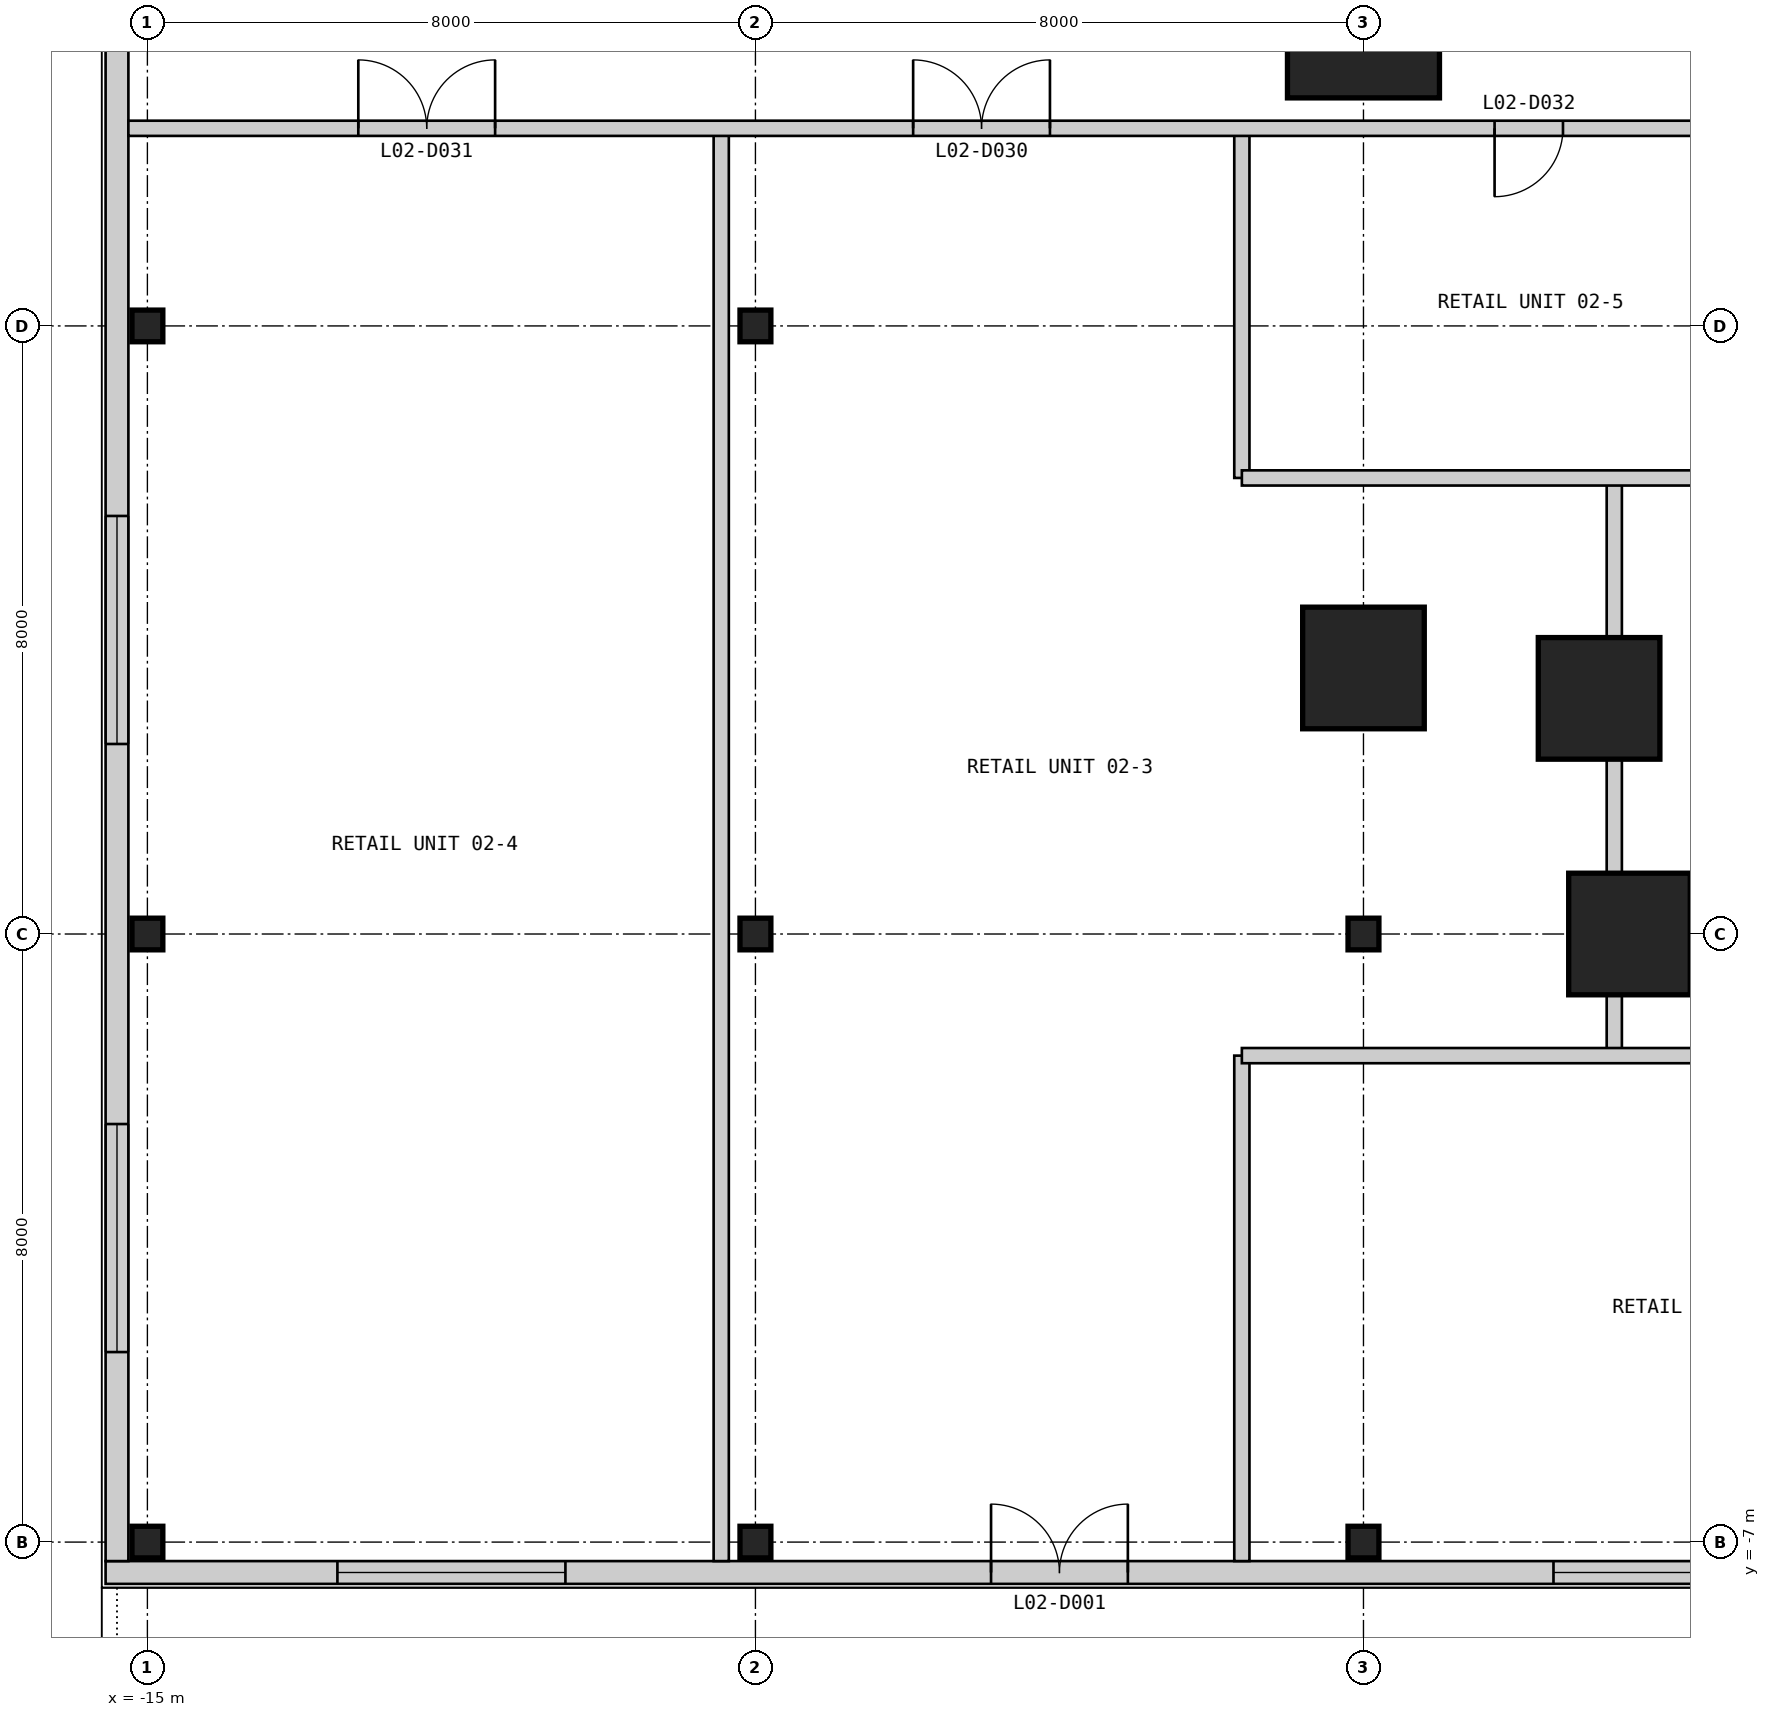
"""IFC4 building model, lengths in metres.
Left out: names, types, materials, properties, quantities, classifications, styles, units other than length and angle.
Written with IfcOpenShell. Run it as: python <this file> out.ifc"""

import sys

from ifc_helpers import new_model, si_unit, direction, frame, frame_2d, origin, origin_2d, place, context, subcontext, project, spatial, rectangle, i_section, extrude, element, fill, save


model = new_model("IFC4")
c1 = context("Model", 3, precision=1e-05, world=origin(), true_north=direction((0.0, 1.0)))
c2 = subcontext(c1, "Body", "Model", "MODEL_VIEW")
j1 = project(units=[si_unit("LENGTHUNIT", "METRE"), si_unit("PLANEANGLEUNIT", "RADIAN")], contexts=[c1])
p1 = place(None, origin())
s1 = spatial("IfcSite", under=j1, at=p1, CompositionType="ELEMENT")
p2 = place(p1, origin())
s2 = spatial("IfcBuilding", under=s1, at=p2, CompositionType="ELEMENT")
p3 = place(p2, frame((0.0, 0.0, 11.8)))
s3 = spatial("IfcBuildingStorey", under=s2, at=p3, CompositionType="ELEMENT", Elevation=11.8)
p4 = place(p3, frame((4.5, 1.0, 0.0), z_axis=(0.0, 0.0, 1.0), x_axis=(1.0, 0.0, 0.0)))
e1 = element("IfcColumn", 1, at=p4, inside=s3, PredefinedType="COLUMN", context=c2, shape_type="SweptSolid", body=[
    extrude(rectangle(XDim=1.6, YDim=1.6, at=origin_2d()), origin(), (0.0, 0.0, 1.0), 4.8),
])
p5 = place(p3, frame((1.0, 13.0, 0.0), z_axis=(0.0, 0.0, 1.0), x_axis=(1.0, 0.0, 0.0)))
e2 = element("IfcColumn", 2, at=p5, inside=s3, PredefinedType="COLUMN", context=c2, shape_type="SweptSolid", body=[
    extrude(rectangle(XDim=2.0, YDim=2.0, at=origin_2d()), origin(), (0.0, 0.0, 1.0), 4.8),
])
for number, where, z_axis, x_axis in (
    (3, (1.0, 4.5, 0.0), (0.0, 0.0, 1.0), (1.0, 0.0, 0.0)),
    (4, (4.1, 4.1, 0.0), (0.0, 0.0, 1.0), (1.0, 0.0, 0.0)),
):
    element("IfcColumn", number, at=place(p3, frame(where, z_axis=z_axis, x_axis=x_axis)), inside=s3, PredefinedType="COLUMN", context=c2, shape_type="SweptSolid", body=[
        extrude(rectangle(XDim=1.6, YDim=1.6, at=origin_2d()), origin(), (0.0, 0.0, 1.0), 4.8),
    ])
for number, where, z_axis, x_axis in (
    (5, (-15.0, -7.0, 0.0), (0.0, 0.0, 1.0), (1.0, 0.0, 0.0)),
    (6, (-15.0, 1.0, 0.0), (0.0, 0.0, 1.0), (1.0, 0.0, 0.0)),
    (7, (-15.0, 9.0, 0.0), (0.0, 0.0, 1.0), (1.0, 0.0, 0.0)),
    (8, (-7.0, -7.0, 0.0), (0.0, 0.0, 1.0), (1.0, 0.0, 0.0)),
    (9, (-7.0, 1.0, 0.0), (0.0, 0.0, 1.0), (1.0, 0.0, 0.0)),
    (10, (-7.0, 9.0, 0.0), (0.0, 0.0, 1.0), (1.0, 0.0, 0.0)),
    (11, (1.0, -7.0, 0.0), (0.0, 0.0, 1.0), (1.0, 0.0, 0.0)),
    (12, (1.0, 1.0, 0.0), (0.0, 0.0, 1.0), (1.0, 0.0, 0.0)),
):
    element("IfcColumn", number, at=place(p3, frame(where, z_axis=z_axis, x_axis=x_axis)), inside=s3, PredefinedType="COLUMN", context=c2, shape_type="SweptSolid", body=[
        extrude(i_section(OverallWidth=0.406, OverallDepth=0.417, WebThickness=0.03, FlangeThickness=0.048, at=origin_2d()), origin(), (0.0, 0.0, 1.0), 4.8),
    ])
p6 = place(p3, frame((-15.55, -7.4, 0.0), z_axis=(0.0, 0.0, 1.0), x_axis=(1.0, 0.0, 0.0)))
e13 = element("IfcWall", 13, at=p6, inside=s3, PredefinedType="SOLIDWALL", context=c2, shape_type="SweptSolid", body=[
    extrude(rectangle(XDim=73.1, YDim=0.3, at=frame_2d((36.55, 0.0))), origin(), (0.0, 0.0, 1.0), 4.5),
])
p7 = place(p6, frame((11.65, 0.0, 0.0)))
e14 = element("IfcOpeningElement", 14, at=p7, cuts=e13, PredefinedType="OPENING", context=c2, shape_type="SweptSolid", body=[
    extrude(rectangle(XDim=1.8, YDim=2.4, at=frame_2d((0.9, 1.2))), frame((0.0, 0.16, 0.0), z_axis=(0.0, -1.0, 0.0), x_axis=(1.0, 0.0, 0.0)), (0.0, 0.0, 1.0), 0.32),
])
p8 = place(p6, frame((45.65, 0.0, 0.0)))
e15 = element("IfcOpeningElement", 15, at=p8, cuts=e13, PredefinedType="OPENING", context=c2, shape_type="SweptSolid", body=[
    extrude(rectangle(XDim=1.8, YDim=2.4, at=frame_2d((0.9, 1.2))), frame((0.0, 0.16, 0.0), z_axis=(0.0, -1.0, 0.0), x_axis=(1.0, 0.0, 0.0)), (0.0, 0.0, 1.0), 0.32),
])
p9 = place(p6, frame((3.05, 0.0, 0.9)))
e16 = element("IfcOpeningElement", 16, at=p9, cuts=e13, PredefinedType="OPENING", context=c2, shape_type="SweptSolid", body=[
    extrude(rectangle(XDim=3.0, YDim=2.4, at=frame_2d((1.5, 1.2))), frame((0.0, 0.16, 0.0), z_axis=(0.0, -1.0, 0.0), x_axis=(1.0, 0.0, 0.0)), (0.0, 0.0, 1.0), 0.32),
])
p10 = place(p6, frame((19.05, 0.0, 0.9)))
e17 = element("IfcOpeningElement", 17, at=p10, cuts=e13, PredefinedType="OPENING", context=c2, shape_type="SweptSolid", body=[
    extrude(rectangle(XDim=3.0, YDim=2.4, at=frame_2d((1.5, 1.2))), frame((0.0, 0.16, 0.0), z_axis=(0.0, -1.0, 0.0), x_axis=(1.0, 0.0, 0.0)), (0.0, 0.0, 1.0), 0.32),
])
p11 = place(p6, frame((33.05, 0.0, 0.9)))
e18 = element("IfcOpeningElement", 18, at=p11, cuts=e13, PredefinedType="OPENING", context=c2, shape_type="SweptSolid", body=[
    extrude(rectangle(XDim=3.0, YDim=2.4, at=frame_2d((1.5, 1.2))), frame((0.0, 0.16, 0.0), z_axis=(0.0, -1.0, 0.0), x_axis=(1.0, 0.0, 0.0)), (0.0, 0.0, 1.0), 0.32),
])
p12 = place(p6, frame((53.55, 0.0, 0.9)))
e19 = element("IfcOpeningElement", 19, at=p12, cuts=e13, PredefinedType="OPENING", context=c2, shape_type="SweptSolid", body=[
    extrude(rectangle(XDim=3.0, YDim=2.4, at=frame_2d((1.5, 1.2))), frame((0.0, 0.16, 0.0), z_axis=(0.0, -1.0, 0.0), x_axis=(1.0, 0.0, 0.0)), (0.0, 0.0, 1.0), 0.32),
])
p13 = place(p6, frame((59.55, 0.0, 0.9)))
e20 = element("IfcOpeningElement", 20, at=p13, cuts=e13, PredefinedType="OPENING", context=c2, shape_type="SweptSolid", body=[
    extrude(rectangle(XDim=3.0, YDim=2.4, at=frame_2d((1.5, 1.2))), frame((0.0, 0.16, 0.0), z_axis=(0.0, -1.0, 0.0), x_axis=(1.0, 0.0, 0.0)), (0.0, 0.0, 1.0), 0.32),
])
p14 = place(p6, frame((67.05, 0.0, 0.9)))
e21 = element("IfcOpeningElement", 21, at=p14, cuts=e13, PredefinedType="OPENING", context=c2, shape_type="SweptSolid", body=[
    extrude(rectangle(XDim=3.0, YDim=2.4, at=frame_2d((1.5, 1.2))), frame((0.0, 0.16, 0.0), z_axis=(0.0, -1.0, 0.0), x_axis=(1.0, 0.0, 0.0)), (0.0, 0.0, 1.0), 0.32),
])
p15 = place(p3, frame((-15.4, 65.25, 0.0), z_axis=(0.0, 0.0, 1.0), x_axis=(0.0, -1.0, 0.0)))
e22 = element("IfcWall", 22, at=p15, inside=s3, PredefinedType="SOLIDWALL", context=c2, shape_type="SweptSolid", body=[
    extrude(rectangle(XDim=72.5, YDim=0.3, at=frame_2d((36.25, 0.0))), origin(), (0.0, 0.0, 1.0), 4.5),
])
p16 = place(p15, frame((66.75, 0.0, 0.9)))
e23 = element("IfcOpeningElement", 23, at=p16, cuts=e22, PredefinedType="OPENING", context=c2, shape_type="SweptSolid", body=[
    extrude(rectangle(XDim=3.0, YDim=2.4, at=frame_2d((1.5, 1.2))), frame((0.0, 0.16, 0.0), z_axis=(0.0, -1.0, 0.0), x_axis=(1.0, 0.0, 0.0)), (0.0, 0.0, 1.0), 0.32),
])
p17 = place(p15, frame((58.75, 0.0, 0.9)))
e24 = element("IfcOpeningElement", 24, at=p17, cuts=e22, PredefinedType="OPENING", context=c2, shape_type="SweptSolid", body=[
    extrude(rectangle(XDim=3.0, YDim=2.4, at=frame_2d((1.5, 1.2))), frame((0.0, 0.16, 0.0), z_axis=(0.0, -1.0, 0.0), x_axis=(1.0, 0.0, 0.0)), (0.0, 0.0, 1.0), 0.32),
])
p18 = place(p15, frame((44.75, 0.0, 0.9)))
e25 = element("IfcOpeningElement", 25, at=p18, cuts=e22, PredefinedType="OPENING", context=c2, shape_type="SweptSolid", body=[
    extrude(rectangle(XDim=3.0, YDim=2.4, at=frame_2d((1.5, 1.2))), frame((0.0, 0.16, 0.0), z_axis=(0.0, -1.0, 0.0), x_axis=(1.0, 0.0, 0.0)), (0.0, 0.0, 1.0), 0.32),
])
p19 = place(p15, frame((32.75, 0.0, 0.9)))
e26 = element("IfcOpeningElement", 26, at=p19, cuts=e22, PredefinedType="OPENING", context=c2, shape_type="SweptSolid", body=[
    extrude(rectangle(XDim=3.0, YDim=2.4, at=frame_2d((1.5, 1.2))), frame((0.0, 0.16, 0.0), z_axis=(0.0, -1.0, 0.0), x_axis=(1.0, 0.0, 0.0)), (0.0, 0.0, 1.0), 0.32),
])
p20 = place(p15, frame((24.25, 0.0, 0.9)))
e27 = element("IfcOpeningElement", 27, at=p20, cuts=e22, PredefinedType="OPENING", context=c2, shape_type="SweptSolid", body=[
    extrude(rectangle(XDim=3.0, YDim=2.4, at=frame_2d((1.5, 1.2))), frame((0.0, 0.16, 0.0), z_axis=(0.0, -1.0, 0.0), x_axis=(1.0, 0.0, 0.0)), (0.0, 0.0, 1.0), 0.32),
])
p21 = place(p15, frame((18.25, 0.0, 0.9)))
e28 = element("IfcOpeningElement", 28, at=p21, cuts=e22, PredefinedType="OPENING", context=c2, shape_type="SweptSolid", body=[
    extrude(rectangle(XDim=3.0, YDim=2.4, at=frame_2d((1.5, 1.2))), frame((0.0, 0.16, 0.0), z_axis=(0.0, -1.0, 0.0), x_axis=(1.0, 0.0, 0.0)), (0.0, 0.0, 1.0), 0.32),
])
p22 = place(p15, frame((10.75, 0.0, 0.9)))
e29 = element("IfcOpeningElement", 29, at=p22, cuts=e22, PredefinedType="OPENING", context=c2, shape_type="SweptSolid", body=[
    extrude(rectangle(XDim=3.0, YDim=2.4, at=frame_2d((1.5, 1.2))), frame((0.0, 0.16, 0.0), z_axis=(0.0, -1.0, 0.0), x_axis=(1.0, 0.0, 0.0)), (0.0, 0.0, 1.0), 0.32),
])
p23 = place(p15, frame((2.75, 0.0, 0.9)))
e30 = element("IfcOpeningElement", 30, at=p23, cuts=e22, PredefinedType="OPENING", context=c2, shape_type="SweptSolid", body=[
    extrude(rectangle(XDim=3.0, YDim=2.4, at=frame_2d((1.5, 1.2))), frame((0.0, 0.16, 0.0), z_axis=(0.0, -1.0, 0.0), x_axis=(1.0, 0.0, 0.0)), (0.0, 0.0, 1.0), 0.32),
])
p24 = place(p3, frame((-7.45, -7.25, 0.0), z_axis=(0.0, 0.0, 1.0), x_axis=(0.0, 1.0, 0.0)))
e31 = element("IfcWall", 31, at=p24, inside=s3, PredefinedType="PARTITIONING", context=c2, shape_type="SweptSolid", body=[
    extrude(rectangle(XDim=18.85, YDim=0.2, at=frame_2d((9.425, 0.0))), origin(), (0.0, 0.0, 1.0), 4.5),
])
p25 = place(p3, frame((-0.6, -7.25, 0.0), z_axis=(0.0, 0.0, 1.0), x_axis=(0.0, 1.0, 0.0)))
e32 = element("IfcWall", 32, at=p25, inside=s3, PredefinedType="PARTITIONING", context=c2, shape_type="SweptSolid", body=[
    extrude(rectangle(XDim=6.65, YDim=0.2, at=frame_2d((3.325, 0.0))), origin(), (0.0, 0.0, 1.0), 4.5),
])
p26 = place(p3, frame((-0.6, 7.0, 0.0), z_axis=(0.0, 0.0, 1.0), x_axis=(0.0, 1.0, 0.0)))
e33 = element("IfcWall", 33, at=p26, inside=s3, PredefinedType="PARTITIONING", context=c2, shape_type="SweptSolid", body=[
    extrude(rectangle(XDim=4.6, YDim=0.2, at=frame_2d((2.3, 0.0))), origin(), (0.0, 0.0, 1.0), 4.5),
])
p27 = place(p3, frame((4.3, -0.6, 0.0), z_axis=(0.0, 0.0, 1.0), x_axis=(0.0, 1.0, 0.0)))
e34 = element("IfcWall", 34, at=p27, inside=s3, PredefinedType="PARTITIONING", context=c2, shape_type="SweptSolid", body=[
    extrude(rectangle(XDim=0.8, YDim=0.2, at=frame_2d((0.4, 0.0))), origin(), (0.0, 0.0, 1.0), 4.5),
])
p28 = place(p3, frame((4.3, 1.8, 0.0), z_axis=(0.0, 0.0, 1.0), x_axis=(0.0, 1.0, 0.0)))
e35 = element("IfcWall", 35, at=p28, inside=s3, PredefinedType="PARTITIONING", context=c2, shape_type="SweptSolid", body=[
    extrude(rectangle(XDim=1.5, YDim=0.2, at=frame_2d((0.75, 0.0))), origin(), (0.0, 0.0, 1.0), 3.65),
])
p29 = place(p3, frame((4.3, 4.9, 0.0), z_axis=(0.0, 0.0, 1.0), x_axis=(0.0, 1.0, 0.0)))
e36 = element("IfcWall", 36, at=p29, inside=s3, PredefinedType="PARTITIONING", context=c2, shape_type="SweptSolid", body=[
    extrude(rectangle(XDim=2.1, YDim=0.2, at=frame_2d((1.05, 0.0))), origin(), (0.0, 0.0, 1.0), 4.5),
])
p30 = place(p3, frame((-0.6, -0.6, 0.0), z_axis=(0.0, 0.0, 1.0), x_axis=(1.0, 0.0, 0.0)))
e37 = element("IfcWall", 37, at=p30, inside=s3, PredefinedType="PARTITIONING", context=c2, shape_type="SweptSolid", body=[
    extrude(rectangle(XDim=12.2, YDim=0.2, at=frame_2d((6.1, 0.0))), origin(), (0.0, 0.0, 1.0), 4.5),
])
p31 = place(p3, frame((-0.6, 7.0, 0.0), z_axis=(0.0, 0.0, 1.0), x_axis=(1.0, 0.0, 0.0)))
e38 = element("IfcWall", 38, at=p31, inside=s3, PredefinedType="PARTITIONING", context=c2, shape_type="SweptSolid", body=[
    extrude(rectangle(XDim=17.0, YDim=0.2, at=frame_2d((8.5, 0.0))), origin(), (0.0, 0.0, 1.0), 4.5),
])
p32 = place(p31, frame((14.125, 0.0, 0.0)))
e39 = element("IfcOpeningElement", 39, at=p32, cuts=e38, PredefinedType="OPENING", context=c2, shape_type="SweptSolid", body=[
    extrude(rectangle(XDim=0.9, YDim=2.2, at=frame_2d((0.45, 1.1))), frame((0.0, 0.11, 0.0), z_axis=(0.0, -1.0, 0.0), x_axis=(1.0, 0.0, 0.0)), (0.0, 0.0, 1.0), 0.22),
])
p33 = place(p3, frame((-15.25, 11.6, 0.0), z_axis=(0.0, 0.0, 1.0), x_axis=(1.0, 0.0, 0.0)))
e40 = element("IfcWall", 40, at=p33, inside=s3, PredefinedType="PARTITIONING", context=c2, shape_type="SweptSolid", body=[
    extrude(rectangle(XDim=22.25, YDim=0.2, at=frame_2d((11.125, 0.0))), origin(), (0.0, 0.0, 1.0), 4.5),
])
p34 = place(p33, frame((10.325, 0.0, 0.0)))
e41 = element("IfcOpeningElement", 41, at=p34, cuts=e40, PredefinedType="OPENING", context=c2, shape_type="SweptSolid", body=[
    extrude(rectangle(XDim=1.8, YDim=2.4, at=frame_2d((0.9, 1.2))), frame((0.0, 0.11, 0.0), z_axis=(0.0, -1.0, 0.0), x_axis=(1.0, 0.0, 0.0)), (0.0, 0.0, 1.0), 0.22),
])
p35 = place(p33, frame((3.025, 0.0, 0.0)))
e42 = element("IfcOpeningElement", 42, at=p35, cuts=e40, PredefinedType="OPENING", context=c2, shape_type="SweptSolid", body=[
    extrude(rectangle(XDim=1.8, YDim=2.4, at=frame_2d((0.9, 1.2))), frame((0.0, 0.11, 0.0), z_axis=(0.0, -1.0, 0.0), x_axis=(1.0, 0.0, 0.0)), (0.0, 0.0, 1.0), 0.22),
])
p36 = place(p33, frame((17.975, 0.0, 0.0)))
e43 = element("IfcOpeningElement", 43, at=p36, cuts=e40, PredefinedType="OPENING", context=c2, shape_type="SweptSolid", body=[
    extrude(rectangle(XDim=0.9, YDim=2.2, at=frame_2d((0.45, 1.1))), frame((0.0, 0.11, 0.0), z_axis=(0.0, -1.0, 0.0), x_axis=(1.0, 0.0, 0.0)), (0.0, 0.0, 1.0), 0.22),
])
p37 = place(p7, origin())
e44 = element("IfcDoor", 44, at=p37, inside=s3, OperationType="DOUBLE_DOOR_SINGLE_SWING", PredefinedType="DOOR", context=c2, shape_type="SweptSolid", body=[
    extrude(rectangle(XDim=1.8, YDim=2.4, at=frame_2d((0.9, 1.2))), frame((0.0, 0.025, 0.0), z_axis=(0.0, -1.0, 0.0), x_axis=(1.0, 0.0, 0.0)), (0.0, 0.0, 1.0), 0.05),
])
fill(e14, e44)
p38 = place(p9, origin())
e45 = element("IfcWindow", 45, at=p38, inside=s3, PartitioningType="SINGLE_PANEL", PredefinedType="WINDOW", context=c2, shape_type="SweptSolid", body=[
    extrude(rectangle(XDim=3.0, YDim=2.4, at=frame_2d((1.5, 1.2))), frame((0.0, 0.03, 0.0), z_axis=(0.0, -1.0, 0.0), x_axis=(1.0, 0.0, 0.0)), (0.0, 0.0, 1.0), 0.06),
])
fill(e16, e45)
p39 = place(p10, origin())
e46 = element("IfcWindow", 46, at=p39, inside=s3, PartitioningType="SINGLE_PANEL", PredefinedType="WINDOW", context=c2, shape_type="SweptSolid", body=[
    extrude(rectangle(XDim=3.0, YDim=2.4, at=frame_2d((1.5, 1.2))), frame((0.0, 0.03, 0.0), z_axis=(0.0, -1.0, 0.0), x_axis=(1.0, 0.0, 0.0)), (0.0, 0.0, 1.0), 0.06),
])
fill(e17, e46)
p40 = place(p16, origin())
e47 = element("IfcWindow", 47, at=p40, inside=s3, PartitioningType="SINGLE_PANEL", PredefinedType="WINDOW", context=c2, shape_type="SweptSolid", body=[
    extrude(rectangle(XDim=3.0, YDim=2.4, at=frame_2d((1.5, 1.2))), frame((0.0, 0.03, 0.0), z_axis=(0.0, -1.0, 0.0), x_axis=(1.0, 0.0, 0.0)), (0.0, 0.0, 1.0), 0.06),
])
fill(e23, e47)
p41 = place(p17, origin())
e48 = element("IfcWindow", 48, at=p41, inside=s3, PartitioningType="SINGLE_PANEL", PredefinedType="WINDOW", context=c2, shape_type="SweptSolid", body=[
    extrude(rectangle(XDim=3.0, YDim=2.4, at=frame_2d((1.5, 1.2))), frame((0.0, 0.03, 0.0), z_axis=(0.0, -1.0, 0.0), x_axis=(1.0, 0.0, 0.0)), (0.0, 0.0, 1.0), 0.06),
])
fill(e24, e48)
p42 = place(p34, origin())
e49 = element("IfcDoor", 49, at=p42, inside=s3, OperationType="DOUBLE_DOOR_SINGLE_SWING", PredefinedType="DOOR", context=c2, shape_type="SweptSolid", body=[
    extrude(rectangle(XDim=1.8, YDim=2.4, at=frame_2d((0.9, 1.2))), frame((0.0, 0.025, 0.0), z_axis=(0.0, -1.0, 0.0), x_axis=(1.0, 0.0, 0.0)), (0.0, 0.0, 1.0), 0.05),
])
fill(e41, e49)
p43 = place(p35, origin())
e50 = element("IfcDoor", 50, at=p43, inside=s3, OperationType="DOUBLE_DOOR_SINGLE_SWING", PredefinedType="DOOR", context=c2, shape_type="SweptSolid", body=[
    extrude(rectangle(XDim=1.8, YDim=2.4, at=frame_2d((0.9, 1.2))), frame((0.0, 0.025, 0.0), z_axis=(0.0, -1.0, 0.0), x_axis=(1.0, 0.0, 0.0)), (0.0, 0.0, 1.0), 0.05),
])
fill(e42, e50)
p44 = place(p36, frame((0.9, 0.0, 0.0), z_axis=(0.0, 0.0, 1.0), x_axis=(-1.0, 0.0, 0.0)))
e51 = element("IfcDoor", 51, at=p44, inside=s3, OperationType="SINGLE_SWING_RIGHT", PredefinedType="DOOR", context=c2, shape_type="SweptSolid", body=[
    extrude(rectangle(XDim=0.9, YDim=2.2, at=frame_2d((0.45, 1.1))), frame((0.0, 0.025, 0.0), z_axis=(0.0, -1.0, 0.0), x_axis=(1.0, 0.0, 0.0)), (0.0, 0.0, 1.0), 0.05),
])
fill(e43, e51)
save(model, sys.argv[1])
